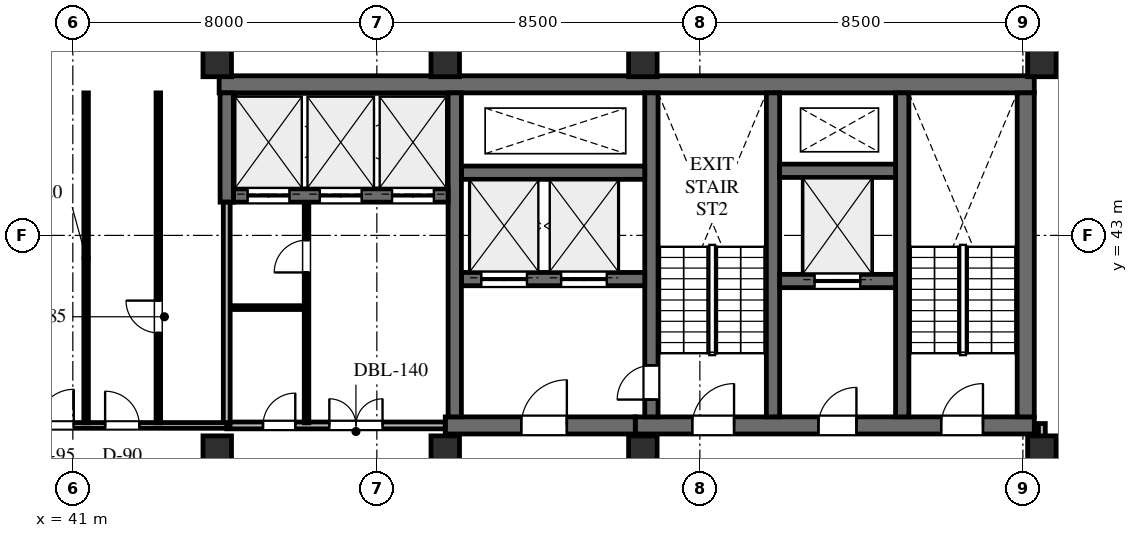
"""IFC4 building model, lengths in metres.
Left out: names, types, materials, properties, quantities, classifications, styles, units other than length and angle.
Written with IfcOpenShell. Run it as: python <this file> out.ifc"""

import sys

from ifc_helpers import new_model, si_unit, direction, frame, frame_2d, origin, origin_2d, place, context, subcontext, project, spatial, rectangle, extrude, element, fill, save


model = new_model("IFC4")
c1 = context("Model", 3, precision=1e-05, world=origin(), true_north=direction((0.0, 1.0)))
c2 = subcontext(c1, "Body", "Model", "MODEL_VIEW")
j1 = project(units=[si_unit("LENGTHUNIT", "METRE"), si_unit("PLANEANGLEUNIT", "RADIAN")], contexts=[c1])
p1 = place(None, origin())
s1 = spatial("IfcSite", under=j1, at=p1, CompositionType="ELEMENT")
p2 = place(p1, origin())
s2 = spatial("IfcBuilding", under=s1, at=p2, CompositionType="ELEMENT")
p3 = place(p2, frame((0.0, 0.0, 270.6)))
s3 = spatial("IfcBuildingStorey", under=s2, at=p3, CompositionType="ELEMENT", Elevation=270.6)
p4 = place(p3, frame((44.85, 46.975, 0.0), z_axis=(0.0, 0.0, 1.0), x_axis=(1.0, 0.0, 0.0)))
e1 = element("IfcWall", 1, at=p4, inside=s3, PredefinedType="SHEAR", context=c2, shape_type="SweptSolid", body=[
    extrude(rectangle(XDim=21.45, YDim=0.45, at=frame_2d((10.725, 0.0))), origin(), (0.0, 0.0, 1.0), 3.6),
])
p5 = place(p3, frame((55.8, 38.0, 0.0), z_axis=(0.0, 0.0, 1.0), x_axis=(1.0, 0.0, 0.0)))
e2 = element("IfcWall", 2, at=p5, inside=s3, PredefinedType="SHEAR", context=c2, shape_type="SweptSolid", body=[
    extrude(rectangle(XDim=10.5, YDim=0.45, at=frame_2d((5.25, 0.0))), origin(), (0.0, 0.0, 1.0), 3.6),
])
p6 = place(p5, frame((1.5, 0.0, 0.0)))
e3 = element("IfcOpeningElement", 3, at=p6, cuts=e2, PredefinedType="OPENING", context=c2, shape_type="SweptSolid", body=[
    extrude(rectangle(XDim=1.1, YDim=2.2, at=frame_2d((0.55, 1.1))), frame((0.0, 0.235, 0.0), z_axis=(0.0, -1.0, 0.0), x_axis=(1.0, 0.0, 0.0)), (0.0, 0.0, 1.0), 0.47),
])
p7 = place(p5, frame((4.82, 0.0, 0.0)))
e4 = element("IfcOpeningElement", 4, at=p7, cuts=e2, PredefinedType="OPENING", context=c2, shape_type="SweptSolid", body=[
    extrude(rectangle(XDim=1.0, YDim=2.15, at=frame_2d((0.5, 1.075))), frame((0.0, 0.235, 0.0), z_axis=(0.0, -1.0, 0.0), x_axis=(1.0, 0.0, 0.0)), (0.0, 0.0, 1.0), 0.47),
])
p8 = place(p5, frame((8.05, 0.0, 0.0)))
e5 = element("IfcOpeningElement", 5, at=p8, cuts=e2, PredefinedType="OPENING", context=c2, shape_type="SweptSolid", body=[
    extrude(rectangle(XDim=1.1, YDim=2.2, at=frame_2d((0.55, 1.1))), frame((0.0, 0.235, 0.0), z_axis=(0.0, -1.0, 0.0), x_axis=(1.0, 0.0, 0.0)), (0.0, 0.0, 1.0), 0.47),
])
p9 = place(p3, frame((66.075, 38.225, 0.0), z_axis=(0.0, 0.0, 1.0), x_axis=(0.0, 1.0, 0.0)))
e6 = element("IfcWall", 6, at=p9, inside=s3, PredefinedType="SHEAR", context=c2, shape_type="SweptSolid", body=[
    extrude(rectangle(XDim=8.525, YDim=0.45, at=frame_2d((4.262, 0.0))), origin(), (0.0, 0.0, 1.0), 3.6),
])
for number, where, z_axis, x_axis in (
    (7, (62.825, 38.225, 0.0), (0.0, 0.0, 1.0), (0.0, 1.0, 0.0)),
    (8, (59.425, 38.225, 0.0), (0.0, 0.0, 1.0), (0.0, 1.0, 0.0)),
):
    element("IfcWall", number, at=place(p3, frame(where, z_axis=z_axis, x_axis=x_axis)), inside=s3, PredefinedType="SHEAR", context=c2, shape_type="SweptSolid", body=[
        extrude(rectangle(XDim=8.525, YDim=0.35, at=frame_2d((4.262, 0.0))), origin(), (0.0, 0.0, 1.0), 3.6),
    ])
p10 = place(p3, frame((56.225, 38.225, 0.0), z_axis=(0.0, 0.0, 1.0), x_axis=(0.0, 1.0, 0.0)))
e9 = element("IfcWall", 9, at=p10, inside=s3, PredefinedType="SHEAR", context=c2, shape_type="SweptSolid", body=[
    extrude(rectangle(XDim=8.525, YDim=0.35, at=frame_2d((4.262, 0.0))), origin(), (0.0, 0.0, 1.0), 3.6),
])
p11 = place(p10, frame((0.455, 0.0, 0.0)))
e10 = element("IfcOpeningElement", 10, at=p11, cuts=e9, PredefinedType="OPENING", context=c2, shape_type="SweptSolid", body=[
    extrude(rectangle(XDim=0.9, YDim=2.15, at=frame_2d((0.45, 1.075))), frame((0.0, 0.185, 0.0), z_axis=(0.0, -1.0, 0.0), x_axis=(1.0, 0.0, 0.0)), (0.0, 0.0, 1.0), 0.37),
])
p12 = place(p3, frame((59.6, 41.8, 0.0), z_axis=(0.0, 0.0, 1.0), x_axis=(1.0, 0.0, 0.0)))
e11 = element("IfcWall", 11, at=p12, inside=s3, PredefinedType="SHEAR", context=c2, shape_type="SweptSolid", body=[
    extrude(rectangle(XDim=3.05, YDim=0.35, at=frame_2d((1.525, 0.0))), origin(), (0.0, 0.0, 1.0), 3.6),
])
p13 = place(p12, frame((0.92, 0.0, 0.0)))
e12 = element("IfcOpeningElement", 12, at=p13, cuts=e11, PredefinedType="OPENING", context=c2, shape_type="SweptSolid", body=[
    extrude(rectangle(XDim=1.2, YDim=2.2, at=frame_2d((0.6, 1.1))), frame((0.0, 0.185, 0.0), z_axis=(0.0, -1.0, 0.0), x_axis=(1.0, 0.0, 0.0)), (0.0, 0.0, 1.0), 0.37),
])
p14 = place(p3, frame((59.6, 44.7, 0.0), z_axis=(0.0, 0.0, 1.0), x_axis=(1.0, 0.0, 0.0)))
e13 = element("IfcWall", 13, at=p14, inside=s3, PredefinedType="SHEAR", context=c2, shape_type="SweptSolid", body=[
    extrude(rectangle(XDim=3.05, YDim=0.35, at=frame_2d((1.525, 0.0))), origin(), (0.0, 0.0, 1.0), 3.6),
])
p15 = place(p3, frame((50.8, 38.0, 0.0), z_axis=(0.0, 0.0, 1.0), x_axis=(1.0, 0.0, 0.0)))
e14 = element("IfcWall", 14, at=p15, inside=s3, PredefinedType="SHEAR", context=c2, shape_type="SweptSolid", body=[
    extrude(rectangle(XDim=5.0, YDim=0.45, at=frame_2d((2.5, 0.0))), origin(), (0.0, 0.0, 1.0), 3.6),
])
p16 = place(p15, frame((2.0, 0.0, 0.0)))
e15 = element("IfcOpeningElement", 15, at=p16, cuts=e14, PredefinedType="OPENING", context=c2, shape_type="SweptSolid", body=[
    extrude(rectangle(XDim=1.2, YDim=2.2, at=frame_2d((0.6, 1.1))), frame((0.0, 0.235, 0.0), z_axis=(0.0, -1.0, 0.0), x_axis=(1.0, 0.0, 0.0)), (0.0, 0.0, 1.0), 0.47),
])
p17 = place(p3, frame((51.225, 41.85, 0.0), z_axis=(0.0, 0.0, 1.0), x_axis=(1.0, 0.0, 0.0)))
e16 = element("IfcWall", 16, at=p17, inside=s3, PredefinedType="SHEAR", context=c2, shape_type="SweptSolid", body=[
    extrude(rectangle(XDim=4.825, YDim=0.35, at=frame_2d((2.413, 0.0))), origin(), (0.0, 0.0, 1.0), 3.6),
])
p18 = place(p17, frame((0.525, 0.0, 0.0)))
e17 = element("IfcOpeningElement", 17, at=p18, cuts=e16, PredefinedType="OPENING", context=c2, shape_type="SweptSolid", body=[
    extrude(rectangle(XDim=1.2, YDim=2.2, at=frame_2d((0.6, 1.1))), frame((0.0, 0.185, 0.0), z_axis=(0.0, -1.0, 0.0), x_axis=(1.0, 0.0, 0.0)), (0.0, 0.0, 1.0), 0.37),
])
p19 = place(p17, frame((2.625, 0.0, 0.0)))
e18 = element("IfcOpeningElement", 18, at=p19, cuts=e16, PredefinedType="OPENING", context=c2, shape_type="SweptSolid", body=[
    extrude(rectangle(XDim=1.2, YDim=2.2, at=frame_2d((0.6, 1.1))), frame((0.0, 0.185, 0.0), z_axis=(0.0, -1.0, 0.0), x_axis=(1.0, 0.0, 0.0)), (0.0, 0.0, 1.0), 0.37),
])
p20 = place(p3, frame((51.225, 44.65, 0.0), z_axis=(0.0, 0.0, 1.0), x_axis=(1.0, 0.0, 0.0)))
e19 = element("IfcWall", 19, at=p20, inside=s3, PredefinedType="SHEAR", context=c2, shape_type="SweptSolid", body=[
    extrude(rectangle(XDim=4.825, YDim=0.35, at=frame_2d((2.413, 0.0))), origin(), (0.0, 0.0, 1.0), 3.6),
])
p21 = place(p3, frame((51.05, 38.225, 0.0), z_axis=(0.0, 0.0, 1.0), x_axis=(0.0, 1.0, 0.0)))
e20 = element("IfcWall", 20, at=p21, inside=s3, PredefinedType="SHEAR", context=c2, shape_type="SweptSolid", body=[
    extrude(rectangle(XDim=8.525, YDim=0.35, at=frame_2d((4.262, 0.0))), origin(), (0.0, 0.0, 1.0), 3.6),
])
p22 = place(p3, frame((45.225, 44.05, 0.0), z_axis=(0.0, 0.0, 1.0), x_axis=(1.0, 0.0, 0.0)))
e21 = element("IfcWall", 21, at=p22, inside=s3, PredefinedType="SHEAR", context=c2, shape_type="SweptSolid", body=[
    extrude(rectangle(XDim=5.65, YDim=0.35, at=frame_2d((2.825, 0.0))), origin(), (0.0, 0.0, 1.0), 3.6),
])
p23 = place(p22, frame((0.375, 0.0, 0.0)))
e22 = element("IfcOpeningElement", 22, at=p23, cuts=e21, PredefinedType="OPENING", context=c2, shape_type="SweptSolid", body=[
    extrude(rectangle(XDim=1.1, YDim=2.2, at=frame_2d((0.55, 1.1))), frame((0.0, 0.185, 0.0), z_axis=(0.0, -1.0, 0.0), x_axis=(1.0, 0.0, 0.0)), (0.0, 0.0, 1.0), 0.37),
])
p24 = place(p22, frame((2.275, 0.0, 0.0)))
e23 = element("IfcOpeningElement", 23, at=p24, cuts=e21, PredefinedType="OPENING", context=c2, shape_type="SweptSolid", body=[
    extrude(rectangle(XDim=1.1, YDim=2.2, at=frame_2d((0.55, 1.1))), frame((0.0, 0.185, 0.0), z_axis=(0.0, -1.0, 0.0), x_axis=(1.0, 0.0, 0.0)), (0.0, 0.0, 1.0), 0.37),
])
p25 = place(p22, frame((4.175, 0.0, 0.0)))
e24 = element("IfcOpeningElement", 24, at=p25, cuts=e21, PredefinedType="OPENING", context=c2, shape_type="SweptSolid", body=[
    extrude(rectangle(XDim=1.1, YDim=2.2, at=frame_2d((0.55, 1.1))), frame((0.0, 0.185, 0.0), z_axis=(0.0, -1.0, 0.0), x_axis=(1.0, 0.0, 0.0)), (0.0, 0.0, 1.0), 0.37),
])
p26 = place(p3, frame((45.05, 43.875, 0.0), z_axis=(0.0, 0.0, 1.0), x_axis=(0.0, 1.0, 0.0)))
e25 = element("IfcWall", 25, at=p26, inside=s3, PredefinedType="SHEAR", context=c2, shape_type="SweptSolid", body=[
    extrude(rectangle(XDim=2.875, YDim=0.35, at=frame_2d((1.438, 0.0))), origin(), (0.0, 0.0, 1.0), 3.6),
])
for number, where, z_axis, x_axis in (
    (26, (66.5, 47.55, 0.0), (0.0, 0.0, 1.0), (1.0, 0.0, 0.0)),
    (27, (56.0, 47.55, 0.0), (0.0, 0.0, 1.0), (1.0, 0.0, 0.0)),
    (28, (66.5, 37.35, 0.0), (0.0, 0.0, 1.0), (1.0, 0.0, 0.0)),
    (29, (56.0, 37.35, 0.0), (0.0, 0.0, 1.0), (1.0, 0.0, 0.0)),
    (30, (50.8, 47.55, 0.0), (0.0, 0.0, 1.0), (1.0, 0.0, 0.0)),
    (31, (50.8, 37.35, 0.0), (0.0, 0.0, 1.0), (1.0, 0.0, 0.0)),
    (32, (44.8, 37.35, 0.0), (0.0, 0.0, 1.0), (1.0, 0.0, 0.0)),
    (33, (44.8, 47.55, 0.0), (0.0, 0.0, 1.0), (1.0, 0.0, 0.0)),
):
    element("IfcColumn", number, at=place(p3, frame(where, z_axis=z_axis, x_axis=x_axis)), inside=s3, PredefinedType="COLUMN", context=c2, shape_type="SweptSolid", body=[
        extrude(rectangle(XDim=0.75, YDim=0.75, at=origin_2d()), origin(), (0.0, 0.0, 1.0), 3.6),
    ])
p27 = place(p3, frame((68.375, 37.8, 0.0), z_axis=(0.0, 0.0, 1.0), x_axis=(-0.139166909111, -0.990268938929, 0.0)))
e34 = element("IfcWall", 34, at=p27, inside=s3, PredefinedType="STANDARD", context=c2, shape_type="SweptSolid", body=[
    extrude(rectangle(XDim=17.529, YDim=0.28, at=frame_2d((8.765, 0.0))), origin(), (0.0, 0.0, 1.0), 3.36),
])
p28 = place(p27, frame((8.036, 0.0, 0.0)))
e35 = element("IfcOpeningElement", 35, at=p28, cuts=e34, PredefinedType="OPENING", context=c2, shape_type="SweptSolid", body=[
    extrude(rectangle(XDim=1.0, YDim=2.15, at=frame_2d((0.5, 1.075))), frame((0.0, 0.15, 0.0), z_axis=(0.0, -1.0, 0.0), x_axis=(1.0, 0.0, 0.0)), (0.0, 0.0, 1.0), 0.3),
])
p29 = place(p27, frame((3.997, 0.0, 0.65)))
e36 = element("IfcOpeningElement", 36, at=p29, cuts=e34, PredefinedType="OPENING", context=c2, shape_type="SweptSolid", body=[
    extrude(rectangle(XDim=1.8, YDim=2.1, at=frame_2d((0.9, 1.05))), frame((0.0, 0.15, 0.0), z_axis=(0.0, -1.0, 0.0), x_axis=(1.0, 0.0, 0.0)), (0.0, 0.0, 1.0), 0.3),
])
p30 = place(p27, frame((11.853, 0.0, 0.65)))
e37 = element("IfcOpeningElement", 37, at=p30, cuts=e34, PredefinedType="OPENING", context=c2, shape_type="SweptSolid", body=[
    extrude(rectangle(XDim=1.8, YDim=2.1, at=frame_2d((0.9, 1.05))), frame((0.0, 0.15, 0.0), z_axis=(0.0, -1.0, 0.0), x_axis=(1.0, 0.0, 0.0)), (0.0, 0.0, 1.0), 0.3),
])
p31 = place(p3, frame((45.05, 38.0, 0.0), z_axis=(0.0, 0.0, 1.0), x_axis=(1.0, 0.0, 0.0)))
e38 = element("IfcWall", 38, at=p31, inside=s3, PredefinedType="STANDARD", context=c2, shape_type="SweptSolid", body=[
    extrude(rectangle(XDim=5.75, YDim=0.18, at=frame_2d((2.875, 0.0))), origin(), (0.0, 0.0, 1.0), 2.664),
])
p32 = place(p31, frame((0.954, 0.0, 0.0)))
e39 = element("IfcOpeningElement", 39, at=p32, cuts=e38, PredefinedType="OPENING", context=c2, shape_type="SweptSolid", body=[
    extrude(rectangle(XDim=0.85, YDim=2.1, at=frame_2d((0.425, 1.05))), frame((0.0, 0.1, 0.0), z_axis=(0.0, -1.0, 0.0), x_axis=(1.0, 0.0, 0.0)), (0.0, 0.0, 1.0), 0.2),
])
p33 = place(p31, frame((2.7, 0.0, 0.0)))
e40 = element("IfcOpeningElement", 40, at=p33, cuts=e38, PredefinedType="OPENING", context=c2, shape_type="SweptSolid", body=[
    extrude(rectangle(XDim=1.4, YDim=2.2, at=frame_2d((0.7, 1.1))), frame((0.0, 0.1, 0.0), z_axis=(0.0, -1.0, 0.0), x_axis=(1.0, 0.0, 0.0)), (0.0, 0.0, 1.0), 0.2),
])
p34 = place(p3, frame((47.15, 38.068, 0.0), z_axis=(0.0, 0.0, 1.0), x_axis=(0.0, 1.0, 0.0)))
e41 = element("IfcWall", 41, at=p34, inside=s3, PredefinedType="PARTITIONING", context=c2, shape_type="SweptSolid", body=[
    extrude(rectangle(XDim=5.799, YDim=0.12, at=frame_2d((2.899, 0.0))), origin(), (0.0, 0.0, 1.0), 3.36),
])
p35 = place(p34, frame((3.957, 0.0, 0.0)))
e42 = element("IfcOpeningElement", 42, at=p35, cuts=e41, PredefinedType="OPENING", context=c2, shape_type="SweptSolid", body=[
    extrude(rectangle(XDim=0.85, YDim=2.1, at=frame_2d((0.425, 1.05))), frame((0.0, 0.07, 0.0), z_axis=(0.0, -1.0, 0.0), x_axis=(1.0, 0.0, 0.0)), (0.0, 0.0, 1.0), 0.14),
])
p36 = place(p3, frame((45.118, 41.1, 0.0), z_axis=(0.0, 0.0, 1.0), x_axis=(1.0, 0.0, 0.0)))
e43 = element("IfcWall", 43, at=p36, inside=s3, PredefinedType="PARTITIONING", context=c2, shape_type="SweptSolid", body=[
    extrude(rectangle(XDim=1.964, YDim=0.1, at=frame_2d((0.982, 0.0))), origin(), (0.0, 0.0, 1.0), 3.36),
])
p37 = place(p3, frame((45.05, 38.0, 0.0), z_axis=(0.0, 0.0, 1.0), x_axis=(0.0, 1.0, 0.0)))
e44 = element("IfcWall", 44, at=p37, inside=s3, PredefinedType="STANDARD", context=c2, shape_type="SweptSolid", body=[
    extrude(rectangle(XDim=5.875, YDim=0.18, at=frame_2d((2.938, 0.0))), origin(), (0.0, 0.0, 1.0), 2.664),
])
p38 = place(p3, frame((28.285, 38.0, 0.0), z_axis=(0.0, 0.0, 1.0), x_axis=(1.0, 0.0, 0.0)))
e45 = element("IfcWall", 45, at=p38, inside=s3, PredefinedType="PARTITIONING", context=c2, shape_type="SweptSolid", body=[
    extrude(rectangle(XDim=16.765, YDim=0.15, at=frame_2d((8.383, 0.0))), origin(), (0.0, 0.0, 1.0), 2.664),
])
p39 = place(p38, frame((11.79, 0.0, 0.0)))
e46 = element("IfcOpeningElement", 46, at=p39, cuts=e45, PredefinedType="OPENING", context=c2, shape_type="SweptSolid", body=[
    extrude(rectangle(XDim=0.95, YDim=2.15, at=frame_2d((0.475, 1.075))), frame((0.0, 0.085, 0.0), z_axis=(0.0, -1.0, 0.0), x_axis=(1.0, 0.0, 0.0)), (0.0, 0.0, 1.0), 0.17),
])
p40 = place(p38, frame((13.565, 0.0, 0.0)))
e47 = element("IfcOpeningElement", 47, at=p40, cuts=e45, PredefinedType="OPENING", context=c2, shape_type="SweptSolid", body=[
    extrude(rectangle(XDim=0.9, YDim=2.1, at=frame_2d((0.45, 1.05))), frame((0.0, 0.085, 0.0), z_axis=(0.0, -1.0, 0.0), x_axis=(1.0, 0.0, 0.0)), (0.0, 0.0, 1.0), 0.17),
])
p41 = place(p3, frame((41.35, 38.068, 0.0), z_axis=(0.0, 0.0, 1.0), x_axis=(0.0, 1.0, 0.0)))
e48 = element("IfcWall", 48, at=p41, inside=s3, PredefinedType="PARTITIONING", context=c2, shape_type="SweptSolid", body=[
    extrude(rectangle(XDim=8.682, YDim=0.12, at=frame_2d((4.341, 0.0))), origin(), (0.0, 0.0, 1.0), 3.36),
])
p42 = place(p3, frame((43.25, 38.068, 0.0), z_axis=(0.0, 0.0, 1.0), x_axis=(0.0, 1.0, 0.0)))
e49 = element("IfcWall", 49, at=p42, inside=s3, PredefinedType="PARTITIONING", context=c2, shape_type="SweptSolid", body=[
    extrude(rectangle(XDim=8.682, YDim=0.12, at=frame_2d((4.341, 0.0))), origin(), (0.0, 0.0, 1.0), 3.36),
])
p43 = place(p42, frame((2.366, 0.0, 0.0)))
e50 = element("IfcOpeningElement", 50, at=p43, cuts=e49, PredefinedType="OPENING", context=c2, shape_type="SweptSolid", body=[
    extrude(rectangle(XDim=0.85, YDim=2.1, at=frame_2d((0.425, 1.05))), frame((0.0, 0.07, 0.0), z_axis=(0.0, -1.0, 0.0), x_axis=(1.0, 0.0, 0.0)), (0.0, 0.0, 1.0), 0.14),
])
p44 = place(p3, frame((66.5, 34.468, 0.0), z_axis=(0.0, 0.0, 1.0), x_axis=(0.0, 1.0, 0.0)))
e51 = element("IfcWall", 51, at=p44, inside=s3, PredefinedType="STANDARD", context=c2, shape_type="SweptSolid", body=[
    extrude(rectangle(XDim=3.582, YDim=0.18, at=frame_2d((1.791, 0.0))), origin(), (0.0, 0.0, 1.0), 2.664),
])
p45 = place(p6, origin())
e52 = element("IfcDoor", 52, at=p45, inside=s3, OperationType="SINGLE_SWING_RIGHT", PredefinedType="DOOR", context=c2, shape_type="SweptSolid", body=[
    extrude(rectangle(XDim=1.1, YDim=2.2, at=frame_2d((0.55, 1.1))), frame((0.0, 0.025, 0.0), z_axis=(0.0, -1.0, 0.0), x_axis=(1.0, 0.0, 0.0)), (0.0, 0.0, 1.0), 0.05),
])
fill(e3, e52)
p46 = place(p7, origin())
e53 = element("IfcDoor", 53, at=p46, inside=s3, OperationType="SINGLE_SWING_RIGHT", PredefinedType="DOOR", context=c2, shape_type="SweptSolid", body=[
    extrude(rectangle(XDim=1.0, YDim=2.15, at=frame_2d((0.5, 1.075))), frame((0.0, 0.025, 0.0), z_axis=(0.0, -1.0, 0.0), x_axis=(1.0, 0.0, 0.0)), (0.0, 0.0, 1.0), 0.05),
])
fill(e4, e53)
p47 = place(p8, origin())
e54 = element("IfcDoor", 54, at=p47, inside=s3, OperationType="SINGLE_SWING_RIGHT", PredefinedType="DOOR", context=c2, shape_type="SweptSolid", body=[
    extrude(rectangle(XDim=1.1, YDim=2.2, at=frame_2d((0.55, 1.1))), frame((0.0, 0.025, 0.0), z_axis=(0.0, -1.0, 0.0), x_axis=(1.0, 0.0, 0.0)), (0.0, 0.0, 1.0), 0.05),
])
fill(e5, e54)
p48 = place(p16, origin())
e55 = element("IfcDoor", 55, at=p48, inside=s3, OperationType="SINGLE_SWING_RIGHT", PredefinedType="DOOR", context=c2, shape_type="SweptSolid", body=[
    extrude(rectangle(XDim=1.2, YDim=2.2, at=frame_2d((0.6, 1.1))), frame((0.0, 0.025, 0.0), z_axis=(0.0, -1.0, 0.0), x_axis=(1.0, 0.0, 0.0)), (0.0, 0.0, 1.0), 0.05),
])
fill(e15, e55)
p49 = place(p11, origin())
e56 = element("IfcDoor", 56, at=p49, inside=s3, OperationType="SINGLE_SWING_LEFT", PredefinedType="DOOR", context=c2, shape_type="SweptSolid", body=[
    extrude(rectangle(XDim=0.9, YDim=2.15, at=frame_2d((0.45, 1.075))), frame((0.0, 0.025, 0.0), z_axis=(0.0, -1.0, 0.0), x_axis=(1.0, 0.0, 0.0)), (0.0, 0.0, 1.0), 0.05),
])
fill(e10, e56)
p50 = place(p23, origin())
e57 = element("IfcDoor", 57, at=p50, inside=s3, OperationType="DOUBLE_DOOR_SLIDING", PredefinedType="DOOR", context=c2, shape_type="SweptSolid", body=[
    extrude(rectangle(XDim=1.1, YDim=2.2, at=frame_2d((0.55, 1.1))), frame((0.0, 0.025, 0.0), z_axis=(0.0, -1.0, 0.0), x_axis=(1.0, 0.0, 0.0)), (0.0, 0.0, 1.0), 0.05),
])
fill(e22, e57)
p51 = place(p24, origin())
e58 = element("IfcDoor", 58, at=p51, inside=s3, OperationType="DOUBLE_DOOR_SLIDING", PredefinedType="DOOR", context=c2, shape_type="SweptSolid", body=[
    extrude(rectangle(XDim=1.1, YDim=2.2, at=frame_2d((0.55, 1.1))), frame((0.0, 0.025, 0.0), z_axis=(0.0, -1.0, 0.0), x_axis=(1.0, 0.0, 0.0)), (0.0, 0.0, 1.0), 0.05),
])
fill(e23, e58)
p52 = place(p25, origin())
e59 = element("IfcDoor", 59, at=p52, inside=s3, OperationType="DOUBLE_DOOR_SLIDING", PredefinedType="DOOR", context=c2, shape_type="SweptSolid", body=[
    extrude(rectangle(XDim=1.1, YDim=2.2, at=frame_2d((0.55, 1.1))), frame((0.0, 0.025, 0.0), z_axis=(0.0, -1.0, 0.0), x_axis=(1.0, 0.0, 0.0)), (0.0, 0.0, 1.0), 0.05),
])
fill(e24, e59)
p53 = place(p18, origin())
e60 = element("IfcDoor", 60, at=p53, inside=s3, OperationType="DOUBLE_DOOR_SLIDING", PredefinedType="DOOR", context=c2, shape_type="SweptSolid", body=[
    extrude(rectangle(XDim=1.2, YDim=2.2, at=frame_2d((0.6, 1.1))), frame((0.0, 0.025, 0.0), z_axis=(0.0, -1.0, 0.0), x_axis=(1.0, 0.0, 0.0)), (0.0, 0.0, 1.0), 0.05),
])
fill(e17, e60)
p54 = place(p19, origin())
e61 = element("IfcDoor", 61, at=p54, inside=s3, OperationType="DOUBLE_DOOR_SLIDING", PredefinedType="DOOR", context=c2, shape_type="SweptSolid", body=[
    extrude(rectangle(XDim=1.2, YDim=2.2, at=frame_2d((0.6, 1.1))), frame((0.0, 0.025, 0.0), z_axis=(0.0, -1.0, 0.0), x_axis=(1.0, 0.0, 0.0)), (0.0, 0.0, 1.0), 0.05),
])
fill(e18, e61)
p55 = place(p13, origin())
e62 = element("IfcDoor", 62, at=p55, inside=s3, OperationType="DOUBLE_DOOR_SLIDING", PredefinedType="DOOR", context=c2, shape_type="SweptSolid", body=[
    extrude(rectangle(XDim=1.2, YDim=2.2, at=frame_2d((0.6, 1.1))), frame((0.0, 0.025, 0.0), z_axis=(0.0, -1.0, 0.0), x_axis=(1.0, 0.0, 0.0)), (0.0, 0.0, 1.0), 0.05),
])
fill(e12, e62)
p56 = place(p32, origin())
e63 = element("IfcDoor", 63, at=p56, inside=s3, OperationType="SINGLE_SWING_RIGHT", PredefinedType="DOOR", context=c2, shape_type="SweptSolid", body=[
    extrude(rectangle(XDim=0.85, YDim=2.1, at=frame_2d((0.425, 1.05))), frame((0.0, 0.025, 0.0), z_axis=(0.0, -1.0, 0.0), x_axis=(1.0, 0.0, 0.0)), (0.0, 0.0, 1.0), 0.05),
])
fill(e39, e63)
p57 = place(p35, origin())
e64 = element("IfcDoor", 64, at=p57, inside=s3, OperationType="SINGLE_SWING_LEFT", PredefinedType="DOOR", context=c2, shape_type="SweptSolid", body=[
    extrude(rectangle(XDim=0.85, YDim=2.1, at=frame_2d((0.425, 1.05))), frame((0.0, 0.025, 0.0), z_axis=(0.0, -1.0, 0.0), x_axis=(1.0, 0.0, 0.0)), (0.0, 0.0, 1.0), 0.05),
])
fill(e42, e64)
p58 = place(p33, origin())
e65 = element("IfcDoor", 65, at=p58, inside=s3, OperationType="DOUBLE_DOOR_SINGLE_SWING", PredefinedType="DOOR", context=c2, shape_type="SweptSolid", body=[
    extrude(rectangle(XDim=1.4, YDim=2.2, at=frame_2d((0.7, 1.1))), frame((0.0, 0.025, 0.0), z_axis=(0.0, -1.0, 0.0), x_axis=(1.0, 0.0, 0.0)), (0.0, 0.0, 1.0), 0.05),
])
fill(e40, e65)
p59 = place(p39, origin())
e66 = element("IfcDoor", 66, at=p59, inside=s3, OperationType="SINGLE_SWING_RIGHT", PredefinedType="DOOR", context=c2, shape_type="SweptSolid", body=[
    extrude(rectangle(XDim=0.95, YDim=2.15, at=frame_2d((0.475, 1.075))), frame((0.0, 0.025, 0.0), z_axis=(0.0, -1.0, 0.0), x_axis=(1.0, 0.0, 0.0)), (0.0, 0.0, 1.0), 0.05),
])
fill(e46, e66)
p60 = place(p40, origin())
e67 = element("IfcDoor", 67, at=p60, inside=s3, OperationType="SINGLE_SWING_LEFT", PredefinedType="DOOR", context=c2, shape_type="SweptSolid", body=[
    extrude(rectangle(XDim=0.9, YDim=2.1, at=frame_2d((0.45, 1.05))), frame((0.0, 0.025, 0.0), z_axis=(0.0, -1.0, 0.0), x_axis=(1.0, 0.0, 0.0)), (0.0, 0.0, 1.0), 0.05),
])
fill(e47, e67)
p61 = place(p43, origin())
e68 = element("IfcDoor", 68, at=p61, inside=s3, OperationType="SINGLE_SWING_RIGHT", PredefinedType="DOOR", context=c2, shape_type="SweptSolid", body=[
    extrude(rectangle(XDim=0.85, YDim=2.1, at=frame_2d((0.425, 1.05))), frame((0.0, 0.025, 0.0), z_axis=(0.0, -1.0, 0.0), x_axis=(1.0, 0.0, 0.0)), (0.0, 0.0, 1.0), 0.05),
])
fill(e50, e68)
save(model, sys.argv[1])
